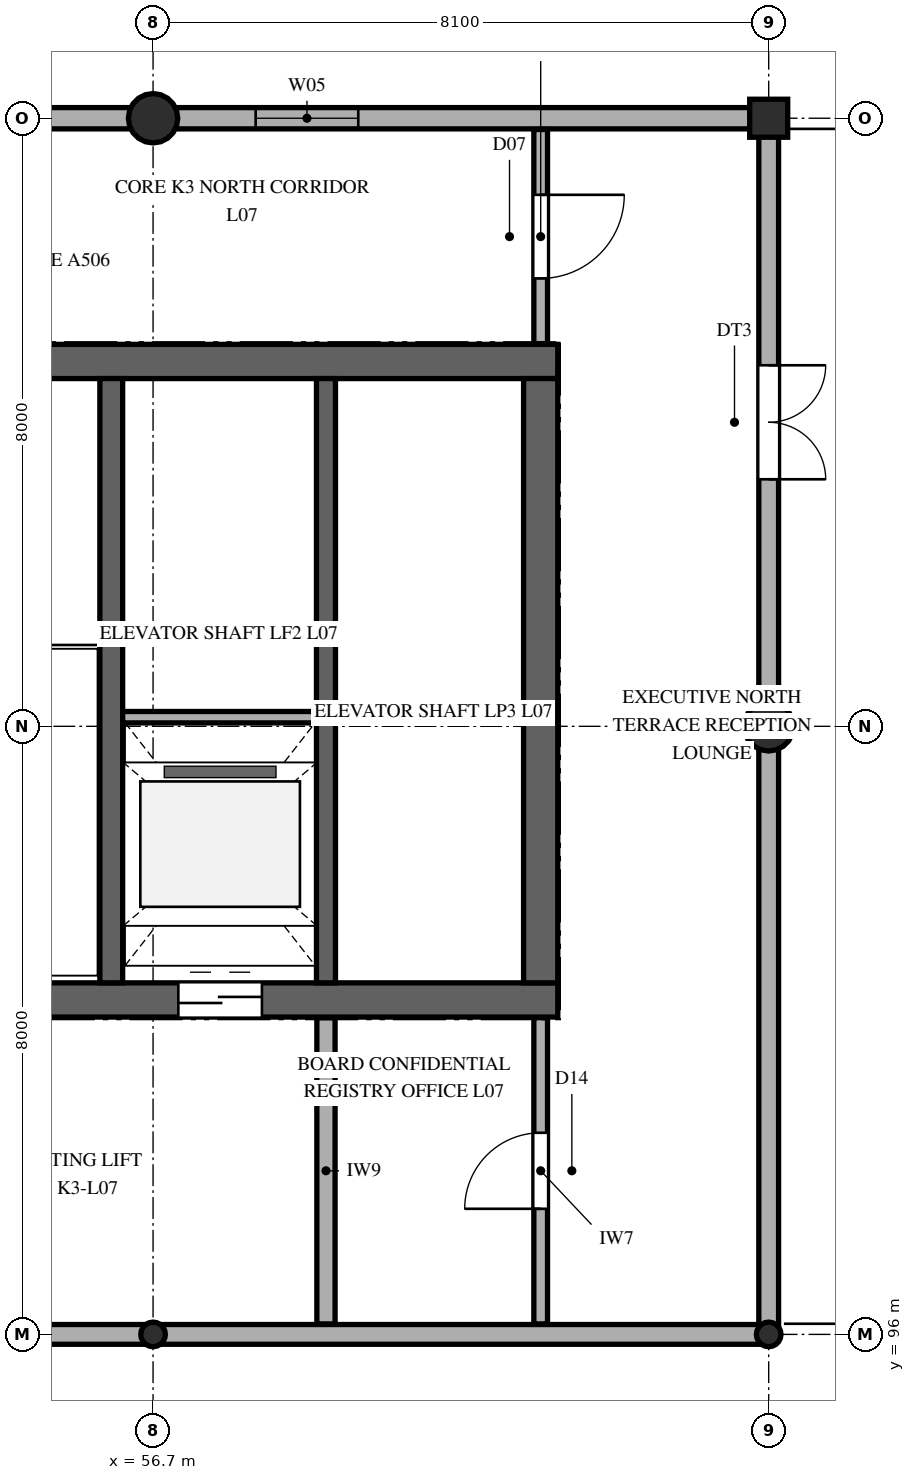
"""IFC4 building model, lengths in metres.
Left out: names, types, materials, properties, quantities, classifications, styles, units other than length and angle.
Written with IfcOpenShell. Run it as: python <this file> out.ifc"""

import sys

from ifc_helpers import new_model, si_unit, direction, frame, frame_2d, origin, origin_2d, place, context, subcontext, project, spatial, rectangle, circle, hollow_circle, extrude, element, fill, save


model = new_model("IFC4")
c1 = context("Model", 3, precision=1e-05, world=origin(), true_north=direction((0.0, 1.0)))
c2 = subcontext(c1, "Body", "Model", "MODEL_VIEW")
j1 = project(units=[si_unit("LENGTHUNIT", "METRE"), si_unit("PLANEANGLEUNIT", "RADIAN")], contexts=[c1])
p1 = place(None, origin())
s1 = spatial("IfcSite", under=j1, at=p1, CompositionType="ELEMENT")
p2 = place(p1, origin())
s2 = spatial("IfcBuilding", under=s1, at=p2, CompositionType="ELEMENT")
p3 = place(p2, frame((0.0, 0.0, 33.3)))
s3 = spatial("IfcBuildingStorey", under=s2, at=p3, CompositionType="ELEMENT", Elevation=33.3)
p4 = place(p3, frame((46.775, 100.4, 0.0), z_axis=(0.0, 0.0, 1.0), x_axis=(1.0, 0.0, 0.0)))
e1 = element("IfcWall", 1, at=p4, inside=s3, PredefinedType="SHEAR", context=c2, shape_type="SweptSolid", body=[
    extrude(rectangle(XDim=15.25, YDim=0.45, at=frame_2d((7.625, 0.0))), origin(), (0.0, 0.0, 1.0), 3.98),
])
p5 = place(p4, frame((0.975, 0.0, 0.0)))
e2 = element("IfcOpeningElement", 2, at=p5, cuts=e1, PredefinedType="OPENING", context=c2, shape_type="SweptSolid", body=[
    extrude(rectangle(XDim=1.15, YDim=2.25, at=frame_2d((0.575, 1.125))), frame((0.0, 0.235, 0.0), z_axis=(0.0, -1.0, 0.0), x_axis=(1.0, 0.0, 0.0)), (0.0, 0.0, 1.0), 0.47),
])
p6 = place(p4, frame((10.258, 0.0, 0.0)))
e3 = element("IfcOpeningElement", 3, at=p6, cuts=e1, PredefinedType="OPENING", context=c2, shape_type="SweptSolid", body=[
    extrude(rectangle(XDim=1.1, YDim=2.2, at=frame_2d((0.55, 1.1))), frame((0.0, 0.235, 0.0), z_axis=(0.0, -1.0, 0.0), x_axis=(1.0, 0.0, 0.0)), (0.0, 0.0, 1.0), 0.47),
])
p7 = place(p3, frame((46.775, 108.8, 0.0), z_axis=(0.0, 0.0, 1.0), x_axis=(1.0, 0.0, 0.0)))
e4 = element("IfcWall", 4, at=p7, inside=s3, PredefinedType="SHEAR", context=c2, shape_type="SweptSolid", body=[
    extrude(rectangle(XDim=15.25, YDim=0.45, at=frame_2d((7.625, 0.0))), origin(), (0.0, 0.0, 1.0), 3.98),
])
p8 = place(p3, frame((61.8, 100.625, 0.0), z_axis=(0.0, 0.0, 1.0), x_axis=(0.0, 1.0, 0.0)))
e5 = element("IfcWall", 5, at=p8, inside=s3, PredefinedType="SHEAR", context=c2, shape_type="SweptSolid", body=[
    extrude(rectangle(XDim=7.95, YDim=0.45, at=frame_2d((3.975, 0.0))), origin(), (0.0, 0.0, 1.0), 3.98),
])
p9 = place(p3, frame((56.15, 100.625, 0.0), z_axis=(0.0, 0.0, 1.0), x_axis=(0.0, 1.0, 0.0)))
e6 = element("IfcWall", 6, at=p9, inside=s3, PredefinedType="SHEAR", context=c2, shape_type="SweptSolid", body=[
    extrude(rectangle(XDim=7.95, YDim=0.3, at=frame_2d((3.975, 0.0))), origin(), (0.0, 0.0, 1.0), 3.98),
])
p10 = place(p3, frame((58.975, 100.625, 0.0), z_axis=(0.0, 0.0, 1.0), x_axis=(0.0, 1.0, 0.0)))
e7 = element("IfcWall", 7, at=p10, inside=s3, PredefinedType="SHEAR", context=c2, shape_type="SweptSolid", body=[
    extrude(rectangle(XDim=7.95, YDim=0.25, at=frame_2d((3.975, 0.0))), origin(), (0.0, 0.0, 1.0), 3.98),
])
p11 = place(p3, frame((56.7, 96.0, 0.0), z_axis=(0.0, 0.0, 1.0), x_axis=(1.0, 0.0, 0.0)))
e8 = element("IfcColumn", 8, at=p11, inside=s3, PredefinedType="COLUMN", context=c2, shape_type="SweptSolid", body=[
    extrude(hollow_circle(Radius=0.162, WallThickness=0.013, at=origin_2d()), origin(), (0.0, 0.0, 1.0), 3.98),
])
p12 = place(p3, frame((56.7, 112.0, 0.0), z_axis=(0.0, 0.0, 1.0), x_axis=(1.0, 0.0, 0.0)))
e9 = element("IfcColumn", 9, at=p12, inside=s3, PredefinedType="COLUMN", context=c2, shape_type="SweptSolid", body=[
    extrude(circle(Radius=0.325, at=origin_2d()), origin(), (0.0, 0.0, 1.0), 3.98),
])
p13 = place(p3, frame((64.8, 96.0, 0.0), z_axis=(0.0, 0.0, 1.0), x_axis=(1.0, 0.0, 0.0)))
e10 = element("IfcColumn", 10, at=p13, inside=s3, PredefinedType="COLUMN", context=c2, shape_type="SweptSolid", body=[
    extrude(hollow_circle(Radius=0.162, WallThickness=0.013, at=origin_2d()), origin(), (0.0, 0.0, 1.0), 3.98),
])
p14 = place(p3, frame((64.8, 104.0, 0.0), z_axis=(0.0, 0.0, 1.0), x_axis=(1.0, 0.0, 0.0)))
e11 = element("IfcColumn", 11, at=p14, inside=s3, PredefinedType="COLUMN", context=c2, shape_type="SweptSolid", body=[
    extrude(circle(Radius=0.325, at=origin_2d()), origin(), (0.0, 0.0, 1.0), 3.98),
])
p15 = place(p3, frame((64.8, 112.0, 0.0), z_axis=(0.0, 0.0, 1.0), x_axis=(1.0, 0.0, 0.0)))
e12 = element("IfcColumn", 12, at=p15, inside=s3, PredefinedType="COLUMN", context=c2, shape_type="SweptSolid", body=[
    extrude(rectangle(XDim=0.5, YDim=0.5, at=origin_2d()), origin(), (0.0, 0.0, 1.0), 3.98),
])
p16 = place(p3, frame((52.74, 96.0, 0.0), z_axis=(0.0, 0.0, 1.0), x_axis=(1.0, 0.0, 0.0)))
e13 = element("IfcWall", 13, at=p16, inside=s3, PredefinedType="SOLIDWALL", context=c2, shape_type="SweptSolid", body=[
    extrude(rectangle(XDim=12.06, YDim=0.26, at=frame_2d((6.03, 0.0))), origin(), (0.0, 0.0, 1.0), 3.655),
])
p17 = place(p3, frame((64.8, 96.0, 0.0), z_axis=(0.0, 0.0, 1.0), x_axis=(0.0, 1.0, 0.0)))
e14 = element("IfcWall", 14, at=p17, inside=s3, PredefinedType="SOLIDWALL", context=c2, shape_type="SweptSolid", body=[
    extrude(rectangle(XDim=16.0, YDim=0.26, at=frame_2d((8.0, 0.0))), origin(), (0.0, 0.0, 1.0), 3.655),
])
p18 = place(p17, frame((11.25, 0.0, 0.0)))
e15 = element("IfcOpeningElement", 15, at=p18, cuts=e14, PredefinedType="OPENING", context=c2, shape_type="SweptSolid", body=[
    extrude(rectangle(XDim=1.5, YDim=2.3, at=frame_2d((0.75, 1.15))), frame((0.0, 0.14, 0.0), z_axis=(0.0, -1.0, 0.0), x_axis=(1.0, 0.0, 0.0)), (0.0, 0.0, 1.0), 0.28),
])
p19 = place(p3, frame((64.8, 112.0, 0.0), z_axis=(0.0, 0.0, 1.0), x_axis=(-1.0, 0.0, 0.0)))
e16 = element("IfcWall", 16, at=p19, inside=s3, PredefinedType="SOLIDWALL", context=c2, shape_type="SweptSolid", body=[
    extrude(rectangle(XDim=12.15, YDim=0.28, at=frame_2d((6.075, 0.0))), origin(), (0.0, 0.0, 1.0), 3.655),
])
p20 = place(p19, frame((5.4, 0.0, 0.95)))
e17 = element("IfcOpeningElement", 17, at=p20, cuts=e16, PredefinedType="OPENING", context=c2, shape_type="SweptSolid", body=[
    extrude(rectangle(XDim=1.35, YDim=1.8, at=frame_2d((0.675, 0.9))), frame((0.0, 0.15, 0.0), z_axis=(0.0, -1.0, 0.0), x_axis=(1.0, 0.0, 0.0)), (0.0, 0.0, 1.0), 0.3),
])
p21 = place(p3, frame((56.3, 104.12, 0.0), z_axis=(0.0, 0.0, 1.0), x_axis=(1.0, 0.0, 0.0)))
e18 = element("IfcWall", 18, at=p21, inside=s3, PredefinedType="PARTITIONING", context=c2, shape_type="SweptSolid", body=[
    extrude(rectangle(XDim=5.25, YDim=0.15, at=frame_2d((2.625, 0.0))), origin(), (0.0, 0.0, 1.0), 3.98),
])
p22 = place(p3, frame((58.975, 96.138, 0.0), z_axis=(0.0, 0.0, 1.0), x_axis=(0.0, 1.0, 0.0)))
e19 = element("IfcWall", 19, at=p22, inside=s3, PredefinedType="PARTITIONING", context=c2, shape_type="SweptSolid", body=[
    extrude(rectangle(XDim=4.029, YDim=0.24, at=frame_2d((2.015, 0.0))), origin(), (0.0, 0.0, 1.0), 3.98),
])
p23 = place(p3, frame((61.8, 96.138, 0.0), z_axis=(0.0, 0.0, 1.0), x_axis=(0.0, 1.0, 0.0)))
e20 = element("IfcWall", 20, at=p23, inside=s3, PredefinedType="PARTITIONING", context=c2, shape_type="SweptSolid", body=[
    extrude(rectangle(XDim=4.029, YDim=0.18, at=frame_2d((2.015, 0.0))), origin(), (0.0, 0.0, 1.0), 3.98),
])
p24 = place(p23, frame((1.514, 0.0, 0.0)))
e21 = element("IfcOpeningElement", 21, at=p24, cuts=e20, PredefinedType="OPENING", context=c2, shape_type="SweptSolid", body=[
    extrude(rectangle(XDim=1.0, YDim=2.15, at=frame_2d((0.5, 1.075))), frame((0.0, 0.1, 0.0), z_axis=(0.0, -1.0, 0.0), x_axis=(1.0, 0.0, 0.0)), (0.0, 0.0, 1.0), 0.2),
])
p25 = place(p3, frame((61.8, 109.033, 0.0), z_axis=(0.0, 0.0, 1.0), x_axis=(0.0, 1.0, 0.0)))
e22 = element("IfcWall", 22, at=p25, inside=s3, PredefinedType="PARTITIONING", context=c2, shape_type="SweptSolid", body=[
    extrude(rectangle(XDim=2.819, YDim=0.18, at=frame_2d((1.41, 0.0))), origin(), (0.0, 0.0, 1.0), 3.98),
])
p26 = place(p25, frame((0.86, 0.0, 0.0)))
e23 = element("IfcOpeningElement", 23, at=p26, cuts=e22, PredefinedType="OPENING", context=c2, shape_type="SweptSolid", body=[
    extrude(rectangle(XDim=1.1, YDim=2.2, at=frame_2d((0.55, 1.1))), frame((0.0, 0.1, 0.0), z_axis=(0.0, -1.0, 0.0), x_axis=(1.0, 0.0, 0.0)), (0.0, 0.0, 1.0), 0.2),
])
p27 = place(p18, frame((1.5, 0.0, 0.0), z_axis=(0.0, 0.0, 1.0), x_axis=(-1.0, 0.0, 0.0)))
e24 = element("IfcDoor", 24, at=p27, inside=s3, OperationType="DOUBLE_DOOR_SINGLE_SWING", PredefinedType="DOOR", context=c2, shape_type="SweptSolid", body=[
    extrude(rectangle(XDim=1.5, YDim=2.3, at=frame_2d((0.75, 1.15))), frame((0.0, 0.025, 0.0), z_axis=(0.0, -1.0, 0.0), x_axis=(1.0, 0.0, 0.0)), (0.0, 0.0, 1.0), 0.05),
])
fill(e15, e24)
p28 = place(p20, origin())
e25 = element("IfcWindow", 25, at=p28, inside=s3, PartitioningType="DOUBLE_PANEL_VERTICAL", PredefinedType="WINDOW", context=c2, shape_type="SweptSolid", body=[
    extrude(rectangle(XDim=1.35, YDim=1.8, at=frame_2d((0.675, 0.9))), frame((0.0, 0.03, 0.0), z_axis=(0.0, -1.0, 0.0), x_axis=(1.0, 0.0, 0.0)), (0.0, 0.0, 1.0), 0.06),
])
fill(e17, e25)
p29 = place(p6, frame((1.1, 0.0, 0.0), z_axis=(0.0, 0.0, 1.0), x_axis=(-1.0, 0.0, 0.0)))
e26 = element("IfcDoor", 26, at=p29, inside=s3, OperationType="DOUBLE_DOOR_SLIDING", PredefinedType="DOOR", context=c2, shape_type="SweptSolid", body=[
    extrude(rectangle(XDim=1.1, YDim=2.2, at=frame_2d((0.55, 1.1))), frame((0.0, 0.025, 0.0), z_axis=(0.0, -1.0, 0.0), x_axis=(1.0, 0.0, 0.0)), (0.0, 0.0, 1.0), 0.05),
])
fill(e3, e26)
p30 = place(p24, origin())
e27 = element("IfcDoor", 27, at=p30, inside=s3, OperationType="SINGLE_SWING_LEFT", PredefinedType="DOOR", context=c2, shape_type="SweptSolid", body=[
    extrude(rectangle(XDim=1.0, YDim=2.15, at=frame_2d((0.5, 1.075))), frame((0.0, 0.025, 0.0), z_axis=(0.0, -1.0, 0.0), x_axis=(1.0, 0.0, 0.0)), (0.0, 0.0, 1.0), 0.05),
])
fill(e21, e27)
p31 = place(p26, frame((1.1, 0.0, 0.0), z_axis=(0.0, 0.0, 1.0), x_axis=(-1.0, 0.0, 0.0)))
e28 = element("IfcDoor", 28, at=p31, inside=s3, OperationType="SINGLE_SWING_RIGHT", PredefinedType="DOOR", context=c2, shape_type="SweptSolid", body=[
    extrude(rectangle(XDim=1.1, YDim=2.2, at=frame_2d((0.55, 1.1))), frame((0.0, 0.025, 0.0), z_axis=(0.0, -1.0, 0.0), x_axis=(1.0, 0.0, 0.0)), (0.0, 0.0, 1.0), 0.05),
])
fill(e23, e28)
save(model, sys.argv[1])
